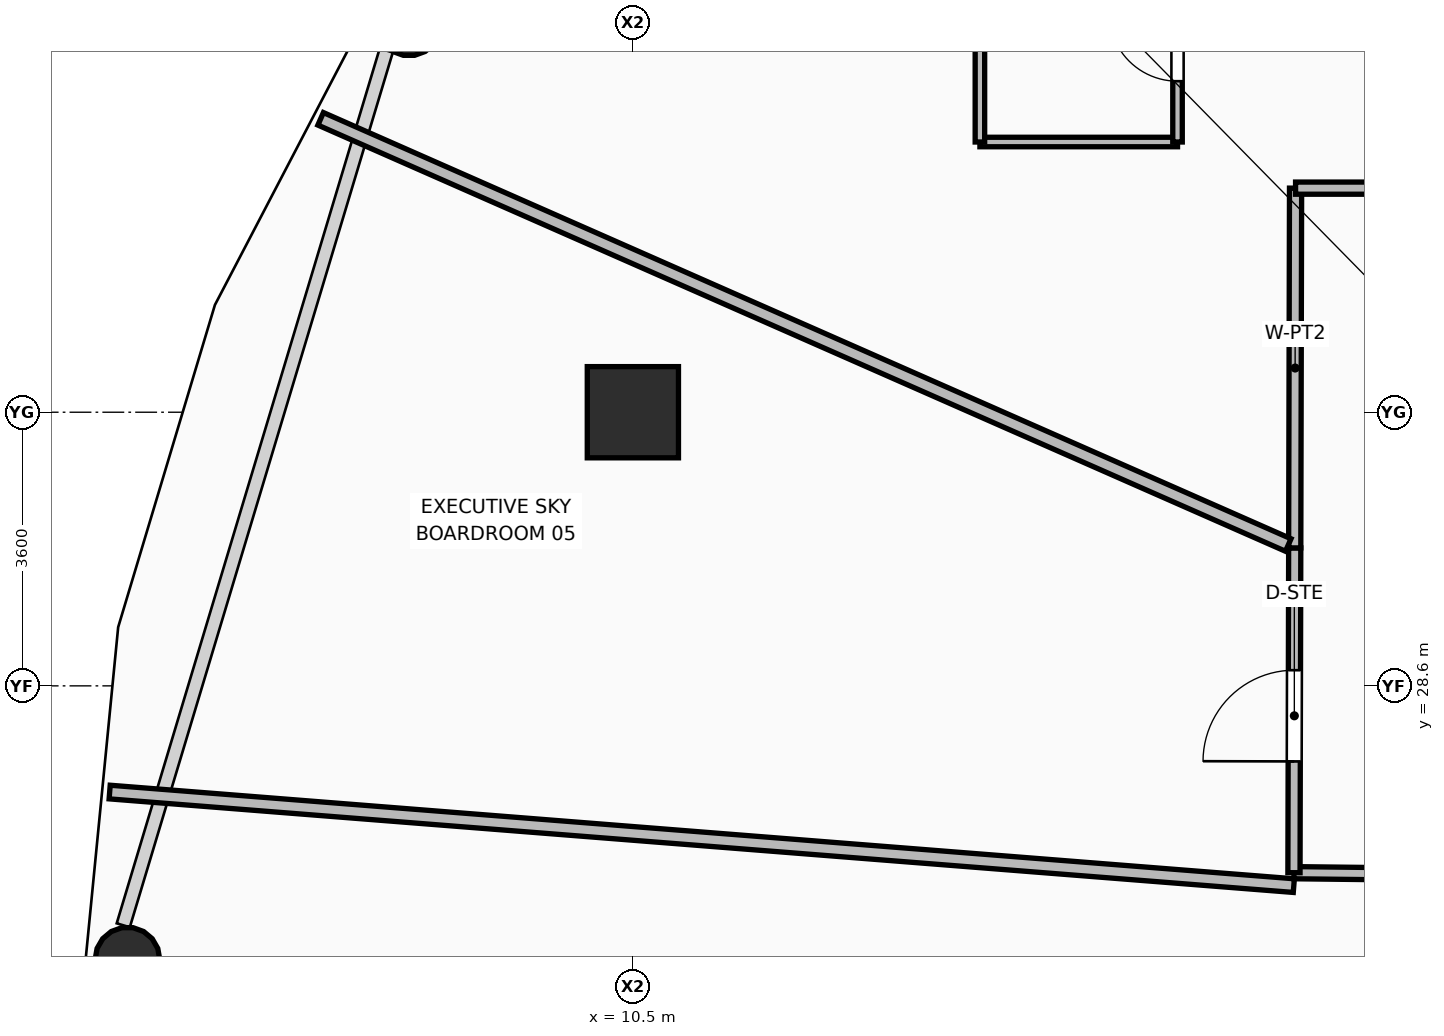
"""IFC4 building model, lengths in metres.
Left out: names, types, materials, properties, quantities, classifications, styles, units other than length and angle.
Written with IfcOpenShell. Run it as: python <this file> out.ifc"""

import sys

from ifc_helpers import new_model, si_unit, direction, frame, frame_2d, origin, origin_2d, place, context, subcontext, project, spatial, rectangle, hollow_rectangle, hollow_circle, extrude, element, fill, save


model = new_model("IFC4")
c1 = context("Model", 3, precision=1e-05, world=origin(), true_north=direction((0.0, 1.0)))
c2 = subcontext(c1, "Body", "Model", "MODEL_VIEW")
j1 = project(units=[si_unit("LENGTHUNIT", "METRE"), si_unit("PLANEANGLEUNIT", "RADIAN")], contexts=[c1])
p1 = place(None, origin())
s1 = spatial("IfcSite", under=j1, at=p1, CompositionType="ELEMENT")
p2 = place(p1, origin())
s2 = spatial("IfcBuilding", under=s1, at=p2, CompositionType="ELEMENT")
p3 = place(p2, frame((0.0, 0.0, 72.0)))
s3 = spatial("IfcBuildingStorey", under=s2, at=p3, CompositionType="ELEMENT", Elevation=72.0)
p4 = place(p3, frame((10.5, 32.2, 0.0), z_axis=(0.0, 0.0, 1.0), x_axis=(1.0, 0.0, 0.0)))
e1 = element("IfcColumn", 1, at=p4, inside=s3, PredefinedType="COLUMN", context=c2, shape_type="SweptSolid", body=[
    extrude(hollow_rectangle(XDim=1.2, YDim=1.2, WallThickness=0.045, at=origin_2d()), origin(), (0.0, 0.0, 1.0), 3.75),
])
for number, where, z_axis, x_axis in (
    (2, (7.554, 37.314, 0.0), (0.0, 0.0, 1.0), (1.0, 0.0, 0.0)),
    (3, (3.85, 25.0, 0.0), (0.0, 0.0, 1.0), (1.0, 0.0, 0.0)),
):
    element("IfcColumn", number, at=place(p3, frame(where, z_axis=z_axis, x_axis=x_axis)), inside=s3, PredefinedType="COLUMN", context=c2, shape_type="SweptSolid", body=[
        extrude(hollow_circle(Radius=0.425, WallThickness=0.04, at=origin_2d()), origin(), (0.0, 0.0, 1.0), 3.57),
    ])
p5 = place(p3, frame((21.395, 26.117, 0.0), z_axis=(0.0, 0.0, 1.0), x_axis=(-0.999934504226, 0.011444966545, 0.0)))
e4 = element("IfcWall", 4, at=p5, inside=s3, PredefinedType="PARTITIONING", context=c2, shape_type="SweptSolid", body=[
    extrude(rectangle(XDim=2.197, YDim=0.16, at=frame_2d((1.099, 0.0))), origin(), (0.0, 0.0, 1.0), 3.55),
])
p6 = place(p3, frame((19.198, 26.142, 0.0), z_axis=(0.0, 0.0, 1.0), x_axis=(0.002342582991, 0.999997256149, 0.0)))
e5 = element("IfcWall", 5, at=p6, inside=s3, PredefinedType="PARTITIONING", context=c2, shape_type="SweptSolid", body=[
    extrude(rectangle(XDim=4.273, YDim=0.16, at=frame_2d((2.136, 0.0))), origin(), (0.0, 0.0, 1.0), 3.55),
])
p7 = place(p6, frame((1.464, 0.0, 0.0)))
e6 = element("IfcOpeningElement", 6, at=p7, cuts=e5, PredefinedType="OPENING", context=c2, shape_type="SweptSolid", body=[
    extrude(rectangle(XDim=1.2, YDim=2.1, at=frame_2d((0.6, 1.05))), frame((0.0, 0.09, 0.0), z_axis=(0.0, -1.0, 0.0), x_axis=(1.0, 0.0, 0.0)), (0.0, 0.0, 1.0), 0.18),
])
p8 = place(p3, frame((19.208, 30.415, 0.0), z_axis=(0.0, 0.0, 1.0), x_axis=(0.002321256513, 0.99999730588, 0.0)))
e7 = element("IfcWall", 7, at=p8, inside=s3, PredefinedType="PARTITIONING", context=c2, shape_type="SweptSolid", body=[
    extrude(rectangle(XDim=4.733, YDim=0.16, at=frame_2d((2.366, 0.0))), origin(), (0.0, 0.0, 1.0), 2.928),
])
p9 = place(p3, frame((19.219, 35.148, 0.0), z_axis=(0.0, 0.0, 1.0), x_axis=(1.0, 0.0, 0.0)))
e8 = element("IfcWall", 8, at=p9, inside=s3, PredefinedType="PARTITIONING", context=c2, shape_type="SweptSolid", body=[
    extrude(rectangle(XDim=7.741, YDim=0.16, at=frame_2d((3.871, 0.0))), origin(), (0.0, 0.0, 1.0), 2.928),
])
p10 = place(p9, frame((4.307, 0.0, 0.0)))
e9 = element("IfcOpeningElement", 9, at=p10, cuts=e8, PredefinedType="OPENING", context=c2, shape_type="SweptSolid", body=[
    extrude(rectangle(XDim=1.2, YDim=2.1, at=frame_2d((0.6, 1.05))), frame((0.0, 0.09, 0.0), z_axis=(0.0, -1.0, 0.0), x_axis=(1.0, 0.0, 0.0)), (0.0, 0.0, 1.0), 0.18),
])
p11 = place(p3, frame((19.123, 30.453, 0.0), z_axis=(0.0, 0.0, 1.0), x_axis=(-0.915167724462, 0.403073239131, 0.0)))
e10 = element("IfcWall", 10, at=p11, inside=s3, PredefinedType="PARTITIONING", context=c2, shape_type="SweptSolid", body=[
    extrude(rectangle(XDim=13.911, YDim=0.18, at=frame_2d((6.956, 0.0))), origin(), (0.0, 0.0, 1.0), 2.775),
])
p12 = place(p3, frame((19.196, 25.972, 0.0), z_axis=(0.0, 0.0, 1.0), x_axis=(-0.996893373325, 0.078762949547, 0.0)))
e11 = element("IfcWall", 11, at=p12, inside=s3, PredefinedType="PARTITIONING", context=c2, shape_type="SweptSolid", body=[
    extrude(rectangle(XDim=15.629, YDim=0.18, at=frame_2d((7.814, 0.0))), origin(), (0.0, 0.0, 1.0), 2.775),
])
p13 = place(p3, frame((15.066, 35.755, 0.0), z_axis=(0.0, 0.0, 1.0), x_axis=(1.0, 0.0, 0.0)))
e12 = element("IfcWall", 12, at=p13, inside=s3, PredefinedType="PARTITIONING", context=c2, shape_type="SweptSolid", body=[
    extrude(rectangle(XDim=2.6, YDim=0.125, at=frame_2d((1.3, 0.0))), origin(), (0.0, 0.0, 1.0), 3.55),
])
p14 = place(p3, frame((15.066, 35.755, 0.0), z_axis=(0.0, 0.0, 1.0), x_axis=(0.0, 1.0, 0.0)))
e13 = element("IfcWall", 13, at=p14, inside=s3, PredefinedType="PARTITIONING", context=c2, shape_type="SweptSolid", body=[
    extrude(rectangle(XDim=2.5, YDim=0.125, at=frame_2d((1.25, 0.0))), origin(), (0.0, 0.0, 1.0), 3.55),
])
p15 = place(p3, frame((17.666, 35.755, 0.0), z_axis=(0.0, 0.0, 1.0), x_axis=(0.0, 1.0, 0.0)))
e14 = element("IfcWall", 14, at=p15, inside=s3, PredefinedType="PARTITIONING", context=c2, shape_type="SweptSolid", body=[
    extrude(rectangle(XDim=2.5, YDim=0.125, at=frame_2d((1.25, 0.0))), origin(), (0.0, 0.0, 1.0), 3.55),
])
p16 = place(p15, frame((0.8, 0.0, 0.0)))
e15 = element("IfcOpeningElement", 15, at=p16, cuts=e14, PredefinedType="OPENING", context=c2, shape_type="SweptSolid", body=[
    extrude(rectangle(XDim=0.9, YDim=2.1, at=frame_2d((0.45, 1.05))), frame((0.0, 0.073, 0.0), z_axis=(0.0, -1.0, 0.0), x_axis=(1.0, 0.0, 0.0)), (0.0, 0.0, 1.0), 0.145),
])
p17 = place(p16, origin())
e16 = element("IfcDoor", 16, at=p17, inside=s3, OperationType="SINGLE_SWING_RIGHT", PredefinedType="DOOR", context=c2, shape_type="SweptSolid", body=[
    extrude(rectangle(XDim=0.9, YDim=2.1, at=frame_2d((0.45, 1.05))), frame((0.0, 0.025, 0.0), z_axis=(0.0, -1.0, 0.0), x_axis=(1.0, 0.0, 0.0)), (0.0, 0.0, 1.0), 0.05),
])
fill(e15, e16)
p18 = place(p7, origin())
e17 = element("IfcDoor", 17, at=p18, inside=s3, OperationType="SINGLE_SWING_LEFT", PredefinedType="DOOR", context=c2, shape_type="SweptSolid", body=[
    extrude(rectangle(XDim=1.2, YDim=2.1, at=frame_2d((0.6, 1.05))), frame((0.0, 0.025, 0.0), z_axis=(0.0, -1.0, 0.0), x_axis=(1.0, 0.0, 0.0)), (0.0, 0.0, 1.0), 0.05),
])
fill(e6, e17)
save(model, sys.argv[1])
